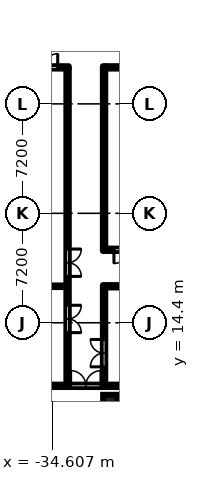
"""IFC4 building model, lengths in metres.
Left out: names, types, materials, properties, quantities, classifications, styles, units other than length and angle.
Written with IfcOpenShell. Run it as: python <this file> out.ifc"""

import sys

from ifc_helpers import new_model, si_unit, direction, frame, frame_2d, origin, origin_2d, place, context, subcontext, project, spatial, rectangle, hollow_circle, extrude, element, fill, save


model = new_model("IFC4")
c1 = context("Model", 3, precision=1e-05, world=origin(), true_north=direction((0.0, 1.0)))
c2 = subcontext(c1, "Body", "Model", "MODEL_VIEW")
j1 = project(units=[si_unit("LENGTHUNIT", "METRE"), si_unit("PLANEANGLEUNIT", "RADIAN")], contexts=[c1])
p1 = place(None, origin())
s1 = spatial("IfcSite", under=j1, at=p1, CompositionType="ELEMENT")
p2 = place(p1, origin())
s2 = spatial("IfcBuilding", under=s1, at=p2, CompositionType="ELEMENT")
p3 = place(p2, origin())
s3 = spatial("IfcBuildingStorey", under=s2, at=p3, CompositionType="ELEMENT", Elevation=0.0)
p4 = place(p3, frame((-30.8, 9.2, 0.0), z_axis=(0.0, 0.0, 1.0), x_axis=(1.0, 0.0, 0.0)))
e1 = element("IfcColumn", 1, at=p4, inside=s3, PredefinedType="COLUMN", context=c2, shape_type="SweptSolid", body=[
    extrude(hollow_circle(Radius=0.457, WallThickness=0.05, at=origin_2d()), origin(), (0.0, 0.0, 1.0), 7.5),
])
p5 = place(p3, frame((-50.22, 10.25, 0.0), z_axis=(0.0, 0.0, 1.0), x_axis=(1.0, 0.0, 0.0)))
e2 = element("IfcWall", 2, at=p5, inside=s3, PredefinedType="PARTITIONING", context=c2, shape_type="SweptSolid", body=[
    extrude(rectangle(XDim=37.545, YDim=0.15, at=frame_2d((18.772, 0.0))), origin(), (0.0, 0.0, 1.0), 6.6),
])
p6 = place(p5, frame((16.82, 0.0, 0.0)))
e3 = element("IfcOpeningElement", 3, at=p6, cuts=e2, PredefinedType="OPENING", context=c2, shape_type="SweptSolid", body=[
    extrude(rectangle(XDim=2.0, YDim=2.1, at=frame_2d((1.0, 1.05))), frame((0.0, 0.085, 0.0), z_axis=(0.0, -1.0, 0.0), x_axis=(1.0, 0.0, 0.0)), (0.0, 0.0, 1.0), 0.17),
])
p7 = place(p5, frame((32.12, 0.0, 0.0)))
e4 = element("IfcOpeningElement", 4, at=p7, cuts=e2, PredefinedType="OPENING", context=c2, shape_type="SweptSolid", body=[
    extrude(rectangle(XDim=1.2, YDim=2.1, at=frame_2d((0.6, 1.05))), frame((0.0, 0.085, 0.0), z_axis=(0.0, -1.0, 0.0), x_axis=(1.0, 0.0, 0.0)), (0.0, 0.0, 1.0), 0.17),
])
p8 = place(p3, frame((-50.22, 16.8, 0.0), z_axis=(0.0, 0.0, 1.0), x_axis=(1.0, 0.0, 0.0)))
e5 = element("IfcWall", 5, at=p8, inside=s3, PredefinedType="PARTITIONING", context=c2, shape_type="SweptSolid", body=[
    extrude(rectangle(XDim=16.545, YDim=0.1, at=frame_2d((8.272, 0.0))), origin(), (0.0, 0.0, 1.0), 6.6),
])
p9 = place(p3, frame((-50.22, 31.2, 0.0), z_axis=(0.0, 0.0, 1.0), x_axis=(1.0, 0.0, 0.0)))
e6 = element("IfcWall", 6, at=p9, inside=s3, PredefinedType="PARTITIONING", context=c2, shape_type="SweptSolid", body=[
    extrude(rectangle(XDim=16.695, YDim=0.15, at=frame_2d((8.348, 0.0))), origin(), (0.0, 0.0, 1.0), 6.6),
])
p10 = place(p9, frame((0.97, 0.0, 0.0)))
e7 = element("IfcOpeningElement", 7, at=p10, cuts=e6, PredefinedType="OPENING", context=c2, shape_type="SweptSolid", body=[
    extrude(rectangle(XDim=1.8, YDim=2.1, at=frame_2d((0.9, 1.05))), frame((0.0, 0.085, 0.0), z_axis=(0.0, -1.0, 0.0), x_axis=(1.0, 0.0, 0.0)), (0.0, 0.0, 1.0), 0.17),
])
p11 = place(p9, frame((14.17, 0.0, 0.0)))
e8 = element("IfcOpeningElement", 8, at=p11, cuts=e6, PredefinedType="OPENING", context=c2, shape_type="SweptSolid", body=[
    extrude(rectangle(XDim=1.8, YDim=2.1, at=frame_2d((0.9, 1.05))), frame((0.0, 0.085, 0.0), z_axis=(0.0, -1.0, 0.0), x_axis=(1.0, 0.0, 0.0)), (0.0, 0.0, 1.0), 0.17),
])
p12 = place(p3, frame((-33.6, 10.325, 0.0), z_axis=(0.0, 0.0, 1.0), x_axis=(0.0, 1.0, 0.0)))
e9 = element("IfcWall", 9, at=p12, inside=s3, PredefinedType="PARTITIONING", context=c2, shape_type="SweptSolid", body=[
    extrude(rectangle(XDim=20.8, YDim=0.15, at=frame_2d((10.4, 0.0))), origin(), (0.0, 0.0, 1.0), 6.6),
])
p13 = place(p12, frame((3.425, 0.0, 0.0)))
e10 = element("IfcOpeningElement", 10, at=p13, cuts=e9, PredefinedType="OPENING", context=c2, shape_type="SweptSolid", body=[
    extrude(rectangle(XDim=1.8, YDim=2.1, at=frame_2d((0.9, 1.05))), frame((0.0, 0.085, 0.0), z_axis=(0.0, -1.0, 0.0), x_axis=(1.0, 0.0, 0.0)), (0.0, 0.0, 1.0), 0.17),
])
p14 = place(p12, frame((7.125, 0.0, 0.0)))
e11 = element("IfcOpeningElement", 11, at=p14, cuts=e9, PredefinedType="OPENING", context=c2, shape_type="SweptSolid", body=[
    extrude(rectangle(XDim=1.8, YDim=2.1, at=frame_2d((0.9, 1.05))), frame((0.0, 0.085, 0.0), z_axis=(0.0, -1.0, 0.0), x_axis=(1.0, 0.0, 0.0)), (0.0, 0.0, 1.0), 0.17),
])
p15 = place(p3, frame((-31.2, 10.325, 0.0), z_axis=(0.0, 0.0, 1.0), x_axis=(0.0, 1.0, 0.0)))
e12 = element("IfcWall", 12, at=p15, inside=s3, PredefinedType="PARTITIONING", context=c2, shape_type="SweptSolid", body=[
    extrude(rectangle(XDim=6.55, YDim=0.15, at=frame_2d((3.275, 0.0))), origin(), (0.0, 0.0, 1.0), 6.6),
])
p16 = place(p15, frame((1.175, 0.0, 0.0)))
e13 = element("IfcOpeningElement", 13, at=p16, cuts=e12, PredefinedType="OPENING", context=c2, shape_type="SweptSolid", body=[
    extrude(rectangle(XDim=1.8, YDim=2.1, at=frame_2d((0.9, 1.05))), frame((0.0, 0.085, 0.0), z_axis=(0.0, -1.0, 0.0), x_axis=(1.0, 0.0, 0.0)), (0.0, 0.0, 1.0), 0.17),
])
p17 = place(p3, frame((-31.125, 16.8, 0.0), z_axis=(0.0, 0.0, 1.0), x_axis=(1.0, 0.0, 0.0)))
e14 = element("IfcWall", 14, at=p17, inside=s3, PredefinedType="PARTITIONING", context=c2, shape_type="SweptSolid", body=[
    extrude(rectangle(XDim=12.6, YDim=0.15, at=frame_2d((6.3, 0.0))), origin(), (0.0, 0.0, 1.0), 6.6),
])
p18 = place(p3, frame((-31.2, 19.125, 0.0), z_axis=(0.0, 0.0, 1.0), x_axis=(0.0, 1.0, 0.0)))
e15 = element("IfcWall", 15, at=p18, inside=s3, PredefinedType="PARTITIONING", context=c2, shape_type="SweptSolid", body=[
    extrude(rectangle(XDim=12.15, YDim=0.15, at=frame_2d((6.075, 0.0))), origin(), (0.0, 0.0, 1.0), 6.6),
])
p19 = place(p3, frame((-31.125, 19.2, 0.0), z_axis=(0.0, 0.0, 1.0), x_axis=(1.0, 0.0, 0.0)))
e16 = element("IfcWall", 16, at=p19, inside=s3, PredefinedType="PARTITIONING", context=c2, shape_type="SweptSolid", body=[
    extrude(rectangle(XDim=12.6, YDim=0.15, at=frame_2d((6.3, 0.0))), origin(), (0.0, 0.0, 1.0), 6.6),
])
p20 = place(p19, frame((0.575, 0.0, 0.0)))
e17 = element("IfcOpeningElement", 17, at=p20, cuts=e16, PredefinedType="OPENING", context=c2, shape_type="SweptSolid", body=[
    extrude(rectangle(XDim=1.8, YDim=2.1, at=frame_2d((0.9, 1.05))), frame((0.0, 0.085, 0.0), z_axis=(0.0, -1.0, 0.0), x_axis=(1.0, 0.0, 0.0)), (0.0, 0.0, 1.0), 0.17),
])
p21 = place(p19, frame((7.137, 0.0, 0.0)))
e18 = element("IfcOpeningElement", 18, at=p21, cuts=e16, PredefinedType="OPENING", context=c2, shape_type="SweptSolid", body=[
    extrude(rectangle(XDim=1.8, YDim=2.1, at=frame_2d((0.9, 1.05))), frame((0.0, 0.085, 0.0), z_axis=(0.0, -1.0, 0.0), x_axis=(1.0, 0.0, 0.0)), (0.0, 0.0, 1.0), 0.17),
])
p22 = place(p3, frame((-31.125, 31.2, 0.0), z_axis=(0.0, 0.0, 1.0), x_axis=(1.0, 0.0, 0.0)))
e19 = element("IfcWall", 19, at=p22, inside=s3, PredefinedType="PARTITIONING", context=c2, shape_type="SweptSolid", body=[
    extrude(rectangle(XDim=12.6, YDim=0.15, at=frame_2d((6.3, 0.0))), origin(), (0.0, 0.0, 1.0), 6.6),
])
p23 = place(p22, frame((1.337, 0.0, 0.0)))
e20 = element("IfcOpeningElement", 20, at=p23, cuts=e19, PredefinedType="OPENING", context=c2, shape_type="SweptSolid", body=[
    extrude(rectangle(XDim=1.8, YDim=2.1, at=frame_2d((0.9, 1.05))), frame((0.0, 0.085, 0.0), z_axis=(0.0, -1.0, 0.0), x_axis=(1.0, 0.0, 0.0)), (0.0, 0.0, 1.0), 0.17),
])
p24 = place(p22, frame((7.375, 0.0, 0.0)))
e21 = element("IfcOpeningElement", 21, at=p24, cuts=e19, PredefinedType="OPENING", context=c2, shape_type="SweptSolid", body=[
    extrude(rectangle(XDim=1.8, YDim=2.1, at=frame_2d((0.9, 1.05))), frame((0.0, 0.085, 0.0), z_axis=(0.0, -1.0, 0.0), x_axis=(1.0, 0.0, 0.0)), (0.0, 0.0, 1.0), 0.17),
])
p25 = place(p6, origin())
e22 = element("IfcDoor", 22, at=p25, inside=s3, OperationType="DOUBLE_DOOR_DOUBLE_SWING", PredefinedType="DOOR", context=c2, shape_type="SweptSolid", body=[
    extrude(rectangle(XDim=2.0, YDim=2.1, at=frame_2d((1.0, 1.05))), frame((0.0, 0.025, 0.0), z_axis=(0.0, -1.0, 0.0), x_axis=(1.0, 0.0, 0.0)), (0.0, 0.0, 1.0), 0.05),
])
fill(e3, e22)
p26 = place(p16, origin())
e23 = element("IfcDoor", 23, at=p26, inside=s3, OperationType="DOUBLE_DOOR_DOUBLE_SWING", PredefinedType="DOOR", context=c2, shape_type="SweptSolid", body=[
    extrude(rectangle(XDim=1.8, YDim=2.1, at=frame_2d((0.9, 1.05))), frame((0.0, 0.025, 0.0), z_axis=(0.0, -1.0, 0.0), x_axis=(1.0, 0.0, 0.0)), (0.0, 0.0, 1.0), 0.05),
])
fill(e13, e23)
p27 = place(p20, frame((1.8, 0.0, 0.0), z_axis=(0.0, 0.0, 1.0), x_axis=(-1.0, 0.0, 0.0)))
e24 = element("IfcDoor", 24, at=p27, inside=s3, OperationType="DOUBLE_DOOR_DOUBLE_SWING", PredefinedType="DOOR", context=c2, shape_type="SweptSolid", body=[
    extrude(rectangle(XDim=1.8, YDim=2.1, at=frame_2d((0.9, 1.05))), frame((0.0, 0.025, 0.0), z_axis=(0.0, -1.0, 0.0), x_axis=(1.0, 0.0, 0.0)), (0.0, 0.0, 1.0), 0.05),
])
fill(e17, e24)
p28 = place(p13, frame((1.8, 0.0, 0.0), z_axis=(0.0, 0.0, 1.0), x_axis=(-1.0, 0.0, 0.0)))
e25 = element("IfcDoor", 25, at=p28, inside=s3, OperationType="DOUBLE_DOOR_DOUBLE_SWING", PredefinedType="DOOR", context=c2, shape_type="SweptSolid", body=[
    extrude(rectangle(XDim=1.8, YDim=2.1, at=frame_2d((0.9, 1.05))), frame((0.0, 0.025, 0.0), z_axis=(0.0, -1.0, 0.0), x_axis=(1.0, 0.0, 0.0)), (0.0, 0.0, 1.0), 0.05),
])
fill(e10, e25)
p29 = place(p11, origin())
e26 = element("IfcDoor", 26, at=p29, inside=s3, OperationType="DOUBLE_DOOR_DOUBLE_SWING", PredefinedType="DOOR", context=c2, shape_type="SweptSolid", body=[
    extrude(rectangle(XDim=1.8, YDim=2.1, at=frame_2d((0.9, 1.05))), frame((0.0, 0.025, 0.0), z_axis=(0.0, -1.0, 0.0), x_axis=(1.0, 0.0, 0.0)), (0.0, 0.0, 1.0), 0.05),
])
fill(e8, e26)
p30 = place(p14, frame((1.8, 0.0, 0.0), z_axis=(0.0, 0.0, 1.0), x_axis=(-1.0, 0.0, 0.0)))
e27 = element("IfcDoor", 27, at=p30, inside=s3, OperationType="DOUBLE_DOOR_DOUBLE_SWING", PredefinedType="DOOR", context=c2, shape_type="SweptSolid", body=[
    extrude(rectangle(XDim=1.8, YDim=2.1, at=frame_2d((0.9, 1.05))), frame((0.0, 0.025, 0.0), z_axis=(0.0, -1.0, 0.0), x_axis=(1.0, 0.0, 0.0)), (0.0, 0.0, 1.0), 0.05),
])
fill(e11, e27)
save(model, sys.argv[1])
